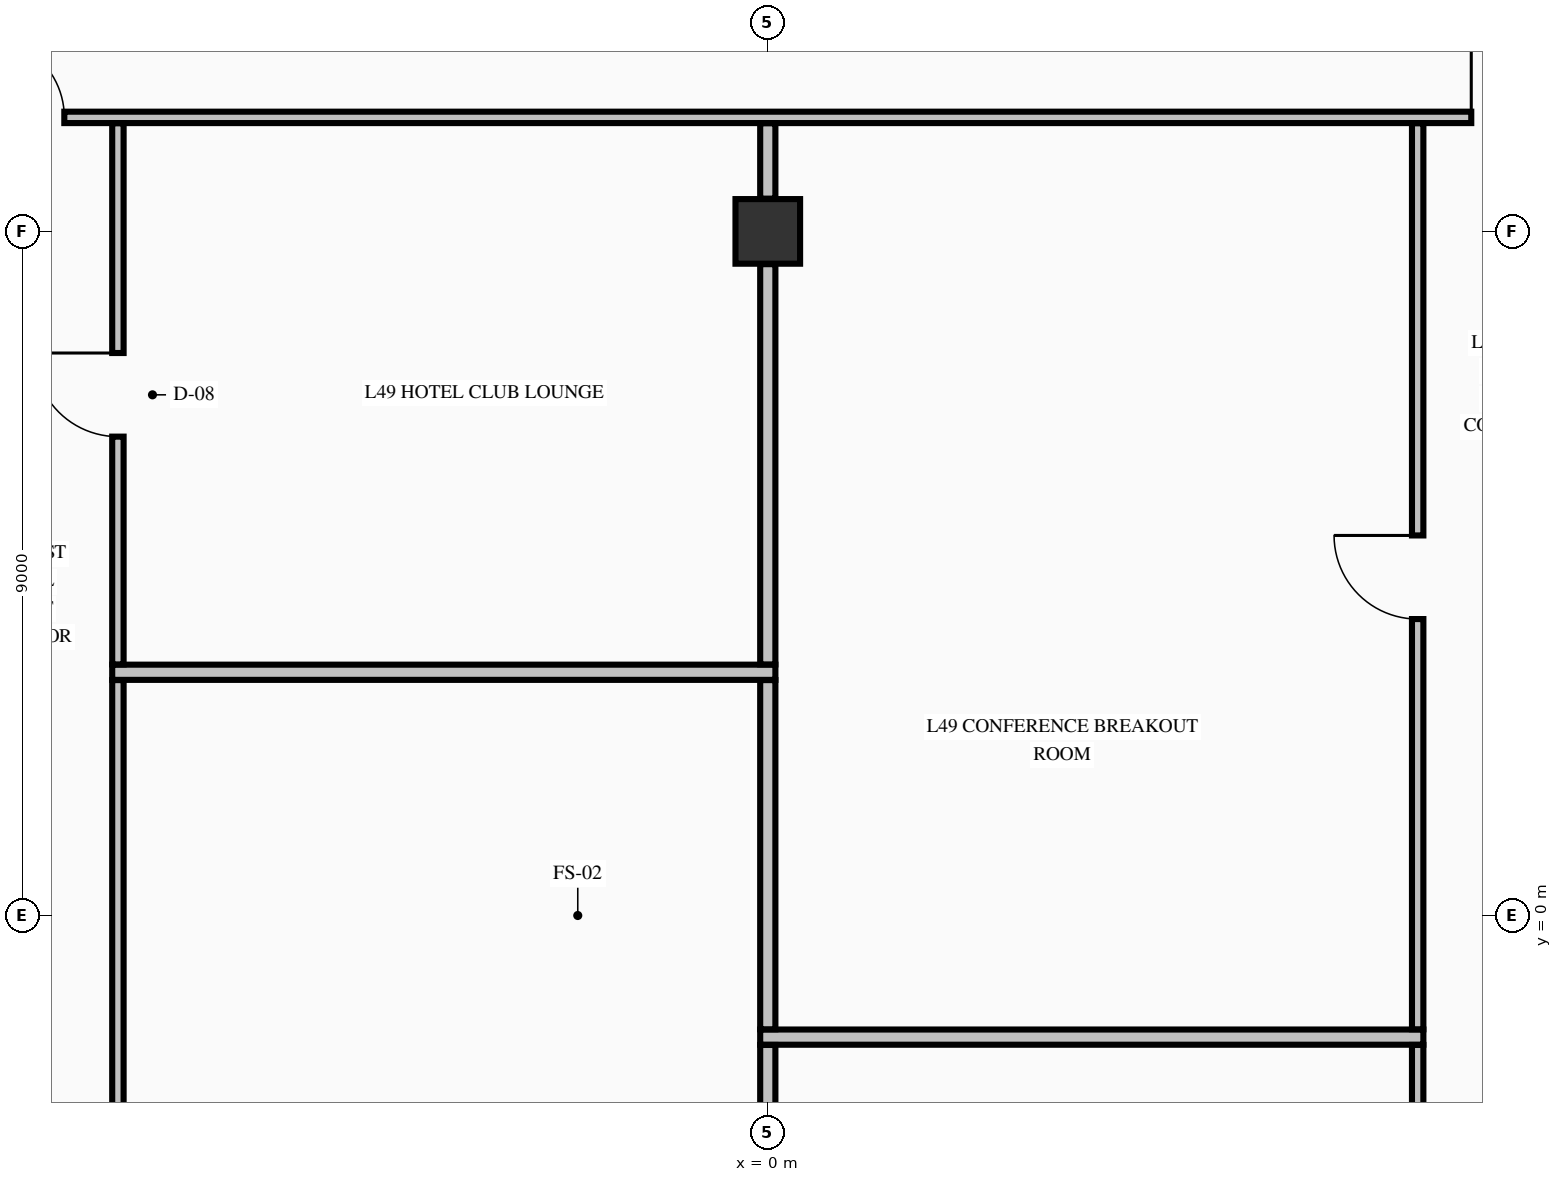
"""IFC4 building model, lengths in metres.
Left out: names, types, materials, properties, quantities, classifications, styles, units other than length and angle.
Written with IfcOpenShell. Run it as: python <this file> out.ifc"""

import sys

from ifc_helpers import new_model, si_unit, direction, frame, frame_2d, origin, origin_2d, place, context, subcontext, project, spatial, rectangle, extrude, element, fill, save


model = new_model("IFC4")
c1 = context("Model", 3, precision=1e-05, world=origin(), true_north=direction((0.0, 1.0)))
c2 = subcontext(c1, "Body", "Model", "MODEL_VIEW")
j1 = project(units=[si_unit("LENGTHUNIT", "METRE"), si_unit("PLANEANGLEUNIT", "RADIAN")], contexts=[c1])
p1 = place(None, origin())
s1 = spatial("IfcSite", under=j1, at=p1, CompositionType="ELEMENT")
p2 = place(p1, origin())
s2 = spatial("IfcBuilding", under=s1, at=p2, CompositionType="ELEMENT")
p3 = place(p2, frame((0.0, 0.0, 191.46)))
s3 = spatial("IfcBuildingStorey", under=s2, at=p3, CompositionType="ELEMENT", Elevation=191.46)
p4 = place(p3, frame((0.0, 9.0, -0.425), z_axis=(0.0, 0.0, 1.0), x_axis=(1.0, 0.0, 0.0)))
e1 = element("IfcColumn", 1, at=p4, inside=s3, PredefinedType="COLUMN", context=c2, shape_type="SweptSolid", body=[
    extrude(rectangle(XDim=0.85, YDim=0.85, at=origin_2d()), origin(), (0.0, 0.0, 1.0), 3.55),
])
for number, where, z_axis, x_axis in (
    (2, (-0.1, -1.6, 0.0), (0.0, 0.0, 1.0), (1.0, 0.0, 0.0)),
    (3, (-8.625, 3.2, 0.0), (0.0, 0.0, 1.0), (1.0, 0.0, 0.0)),
):
    element("IfcWall", number, at=place(p3, frame(where, z_axis=z_axis, x_axis=x_axis)), inside=s3, PredefinedType="PARTITIONING", context=c2, shape_type="SweptSolid", body=[
        extrude(rectangle(XDim=8.725, YDim=0.2, at=frame_2d((4.363, 0.0))), origin(), (0.0, 0.0, 1.0), 3.125),
    ])
p5 = place(p3, frame((-10.569, 10.5, 0.0), z_axis=(0.0, 0.0, 1.0), x_axis=(1.0, 0.0, 0.0)))
e4 = element("IfcWall", 4, at=p5, inside=s3, PredefinedType="PARTITIONING", context=c2, shape_type="SweptSolid", body=[
    extrude(rectangle(XDim=21.138, YDim=0.15, at=frame_2d((10.569, 0.0))), origin(), (0.0, 0.0, 1.0), 3.125),
])
p6 = place(p5, frame((0.264, 0.0, 0.0)))
e5 = element("IfcOpeningElement", 5, at=p6, cuts=e4, PredefinedType="OPENING", context=c2, shape_type="SweptSolid", body=[
    extrude(rectangle(XDim=1.05, YDim=2.15, at=frame_2d((0.525, 1.075))), frame((0.0, 0.085, 0.0), z_axis=(0.0, -1.0, 0.0), x_axis=(1.0, 0.0, 0.0)), (0.0, 0.0, 1.0), 0.17),
])
p7 = place(p5, frame((19.824, 0.0, 0.0)))
e6 = element("IfcOpeningElement", 6, at=p7, cuts=e4, PredefinedType="OPENING", context=c2, shape_type="SweptSolid", body=[
    extrude(rectangle(XDim=1.05, YDim=2.15, at=frame_2d((0.525, 1.075))), frame((0.0, 0.085, 0.0), z_axis=(0.0, -1.0, 0.0), x_axis=(1.0, 0.0, 0.0)), (0.0, 0.0, 1.0), 0.17),
])
p8 = place(p3, frame((-8.55, -9.872, 0.0), z_axis=(0.0, 0.0, 1.0), x_axis=(0.0, 1.0, 0.0)))
e7 = element("IfcWall", 7, at=p8, inside=s3, PredefinedType="PARTITIONING", context=c2, shape_type="SweptSolid", body=[
    extrude(rectangle(XDim=12.969, YDim=0.15, at=frame_2d((6.484, 0.0))), origin(), (0.0, 0.0, 1.0), 3.125),
])
p9 = place(p8, frame((6.002, 0.0, 0.0)))
e8 = element("IfcOpeningElement", 8, at=p9, cuts=e7, PredefinedType="OPENING", context=c2, shape_type="SweptSolid", body=[
    extrude(rectangle(XDim=1.0, YDim=2.15, at=frame_2d((0.5, 1.075))), frame((0.0, 0.085, 0.0), z_axis=(0.0, -1.0, 0.0), x_axis=(1.0, 0.0, 0.0)), (0.0, 0.0, 1.0), 0.17),
])
p10 = place(p3, frame((-8.55, 3.303, 0.0), z_axis=(0.0, 0.0, 1.0), x_axis=(0.0, 1.0, 0.0)))
e9 = element("IfcWall", 9, at=p10, inside=s3, PredefinedType="PARTITIONING", context=c2, shape_type="SweptSolid", body=[
    extrude(rectangle(XDim=7.119, YDim=0.15, at=frame_2d((3.56, 0.0))), origin(), (0.0, 0.0, 1.0), 3.125),
])
p11 = place(p10, frame((2.997, 0.0, 0.0)))
e10 = element("IfcOpeningElement", 10, at=p11, cuts=e9, PredefinedType="OPENING", context=c2, shape_type="SweptSolid", body=[
    extrude(rectangle(XDim=1.1, YDim=2.15, at=frame_2d((0.55, 1.075))), frame((0.0, 0.085, 0.0), z_axis=(0.0, -1.0, 0.0), x_axis=(1.0, 0.0, 0.0)), (0.0, 0.0, 1.0), 0.17),
])
p12 = place(p3, frame((0.0, -5.097, 0.0), z_axis=(0.0, 0.0, 1.0), x_axis=(0.0, 1.0, 0.0)))
e11 = element("IfcWall", 11, at=p12, inside=s3, PredefinedType="PARTITIONING", context=c2, shape_type="SweptSolid", body=[
    extrude(rectangle(XDim=3.394, YDim=0.2, at=frame_2d((1.697, 0.0))), origin(), (0.0, 0.0, 1.0), 2.317),
])
p13 = place(p3, frame((0.0, -1.497, 0.0), z_axis=(0.0, 0.0, 1.0), x_axis=(0.0, 1.0, 0.0)))
e12 = element("IfcWall", 12, at=p13, inside=s3, PredefinedType="PARTITIONING", context=c2, shape_type="SweptSolid", body=[
    extrude(rectangle(XDim=4.594, YDim=0.2, at=frame_2d((2.297, 0.0))), origin(), (0.0, 0.0, 1.0), 2.317),
])
p14 = place(p3, frame((0.0, 3.303, 0.0), z_axis=(0.0, 0.0, 1.0), x_axis=(0.0, 1.0, 0.0)))
e13 = element("IfcWall", 13, at=p14, inside=s3, PredefinedType="PARTITIONING", context=c2, shape_type="SweptSolid", body=[
    extrude(rectangle(XDim=5.266, YDim=0.2, at=frame_2d((2.633, 0.0))), origin(), (0.0, 0.0, 1.0), 2.317),
])
p15 = place(p3, frame((0.0, 9.431, 0.0), z_axis=(0.0, 0.0, 1.0), x_axis=(0.0, 1.0, 0.0)))
e14 = element("IfcWall", 14, at=p15, inside=s3, PredefinedType="PARTITIONING", context=c2, shape_type="SweptSolid", body=[
    extrude(rectangle(XDim=0.991, YDim=0.2, at=frame_2d((0.496, 0.0))), origin(), (0.0, 0.0, 1.0), 2.317),
])
p16 = place(p3, frame((8.55, -5.097, 0.0), z_axis=(0.0, 0.0, 1.0), x_axis=(0.0, 1.0, 0.0)))
e15 = element("IfcWall", 15, at=p16, inside=s3, PredefinedType="PARTITIONING", context=c2, shape_type="SweptSolid", body=[
    extrude(rectangle(XDim=3.394, YDim=0.15, at=frame_2d((1.697, 0.0))), origin(), (0.0, 0.0, 1.0), 3.125),
])
p17 = place(p16, frame((1.222, 0.0, 0.0)))
e16 = element("IfcOpeningElement", 16, at=p17, cuts=e15, PredefinedType="OPENING", context=c2, shape_type="SweptSolid", body=[
    extrude(rectangle(XDim=0.95, YDim=2.15, at=frame_2d((0.475, 1.075))), frame((0.0, 0.085, 0.0), z_axis=(0.0, -1.0, 0.0), x_axis=(1.0, 0.0, 0.0)), (0.0, 0.0, 1.0), 0.17),
])
p18 = place(p3, frame((8.55, -1.497, 0.0), z_axis=(0.0, 0.0, 1.0), x_axis=(0.0, 1.0, 0.0)))
e17 = element("IfcWall", 17, at=p18, inside=s3, PredefinedType="PARTITIONING", context=c2, shape_type="SweptSolid", body=[
    extrude(rectangle(XDim=11.919, YDim=0.15, at=frame_2d((5.959, 0.0))), origin(), (0.0, 0.0, 1.0), 3.125),
])
p19 = place(p18, frame((5.397, 0.0, 0.0)))
e18 = element("IfcOpeningElement", 18, at=p19, cuts=e17, PredefinedType="OPENING", context=c2, shape_type="SweptSolid", body=[
    extrude(rectangle(XDim=1.1, YDim=2.15, at=frame_2d((0.55, 1.075))), frame((0.0, 0.085, 0.0), z_axis=(0.0, -1.0, 0.0), x_axis=(1.0, 0.0, 0.0)), (0.0, 0.0, 1.0), 0.17),
])
p20 = place(p6, origin())
e19 = element("IfcDoor", 19, at=p20, inside=s3, OperationType="SINGLE_SWING_LEFT", PredefinedType="DOOR", context=c2, shape_type="SweptSolid", body=[
    extrude(rectangle(XDim=1.05, YDim=2.15, at=frame_2d((0.525, 1.075))), frame((0.0, 0.025, 0.0), z_axis=(0.0, -1.0, 0.0), x_axis=(1.0, 0.0, 0.0)), (0.0, 0.0, 1.0), 0.05),
])
fill(e5, e19)
p21 = place(p7, origin())
e20 = element("IfcDoor", 20, at=p21, inside=s3, OperationType="SINGLE_SWING_LEFT", PredefinedType="DOOR", context=c2, shape_type="SweptSolid", body=[
    extrude(rectangle(XDim=1.05, YDim=2.15, at=frame_2d((0.525, 1.075))), frame((0.0, 0.025, 0.0), z_axis=(0.0, -1.0, 0.0), x_axis=(1.0, 0.0, 0.0)), (0.0, 0.0, 1.0), 0.05),
])
fill(e6, e20)
p22 = place(p11, origin())
e21 = element("IfcDoor", 21, at=p22, inside=s3, OperationType="SINGLE_SWING_RIGHT", PredefinedType="DOOR", context=c2, shape_type="SweptSolid", body=[
    extrude(rectangle(XDim=1.1, YDim=2.15, at=frame_2d((0.55, 1.075))), frame((0.0, 0.025, 0.0), z_axis=(0.0, -1.0, 0.0), x_axis=(1.0, 0.0, 0.0)), (0.0, 0.0, 1.0), 0.05),
])
fill(e10, e21)
p23 = place(p19, origin())
e22 = element("IfcDoor", 22, at=p23, inside=s3, OperationType="SINGLE_SWING_RIGHT", PredefinedType="DOOR", context=c2, shape_type="SweptSolid", body=[
    extrude(rectangle(XDim=1.1, YDim=2.15, at=frame_2d((0.55, 1.075))), frame((0.0, 0.025, 0.0), z_axis=(0.0, -1.0, 0.0), x_axis=(1.0, 0.0, 0.0)), (0.0, 0.0, 1.0), 0.05),
])
fill(e18, e22)
save(model, sys.argv[1])
